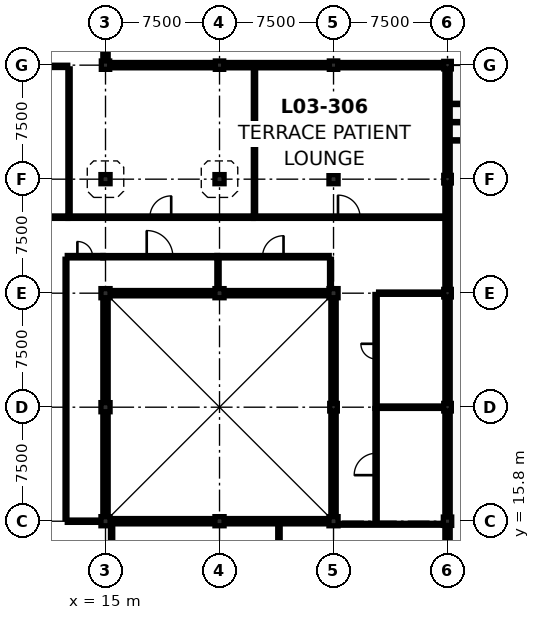
"""IFC4 building model, lengths in metres.
Left out: names, types, materials, properties, quantities, classifications, styles, units other than length and angle.
Written with IfcOpenShell. Run it as: python <this file> out.ifc"""

import sys

from ifc_helpers import new_model, si_unit, direction, frame, frame_2d, origin, origin_2d, place, context, subcontext, project, spatial, rectangle, extrude, element, fill, save


model = new_model("IFC4")
c1 = context("Model", 3, precision=1e-05, world=origin(), true_north=direction((0.0, 1.0)))
c2 = subcontext(c1, "Body", "Model", "MODEL_VIEW")
j1 = project(units=[si_unit("LENGTHUNIT", "METRE"), si_unit("PLANEANGLEUNIT", "RADIAN")], contexts=[c1])
p1 = place(None, origin())
s1 = spatial("IfcSite", under=j1, at=p1, CompositionType="ELEMENT")
p2 = place(p1, origin())
s2 = spatial("IfcBuilding", under=s1, at=p2, CompositionType="ELEMENT")
p3 = place(p2, frame((0.0, 0.0, 13.5)))
s3 = spatial("IfcBuildingStorey", under=s2, at=p3, CompositionType="ELEMENT", Elevation=13.5)
for number, where, z_axis, x_axis in (
    (1, (15.0, 15.8, 0.0), (0.0, 0.0, 1.0), (1.0, 0.0, 0.0)),
    (2, (15.0, 23.3, 0.0), (0.0, 0.0, 1.0), (1.0, 0.0, 0.0)),
    (3, (15.0, 30.8, 0.0), (0.0, 0.0, 1.0), (1.0, 0.0, 0.0)),
    (4, (15.0, 38.3, 0.0), (0.0, 0.0, 1.0), (1.0, 0.0, 0.0)),
):
    element("IfcColumn", number, at=place(p3, frame(where, z_axis=z_axis, x_axis=x_axis)), inside=s3, PredefinedType="COLUMN", context=c2, shape_type="SweptSolid", body=[
        extrude(rectangle(XDim=0.6, YDim=0.6, at=origin_2d()), origin(), (0.0, 0.0, 1.0), 3.72),
    ])
p4 = place(p3, frame((15.0, 45.8, 0.0), z_axis=(0.0, 0.0, 1.0), x_axis=(1.0, 0.0, 0.0)))
e5 = element("IfcColumn", 5, at=p4, inside=s3, PredefinedType="COLUMN", context=c2, shape_type="SweptSolid", body=[
    extrude(rectangle(XDim=0.55, YDim=0.55, at=origin_2d()), origin(), (0.0, 0.0, 1.0), 3.72),
])
for number, where, z_axis, x_axis in (
    (6, (22.5, 15.8, 0.0), (0.0, 0.0, 1.0), (1.0, 0.0, 0.0)),
    (7, (22.5, 30.8, 0.0), (0.0, 0.0, 1.0), (1.0, 0.0, 0.0)),
    (8, (22.5, 38.3, 0.0), (0.0, 0.0, 1.0), (1.0, 0.0, 0.0)),
):
    element("IfcColumn", number, at=place(p3, frame(where, z_axis=z_axis, x_axis=x_axis)), inside=s3, PredefinedType="COLUMN", context=c2, shape_type="SweptSolid", body=[
        extrude(rectangle(XDim=0.6, YDim=0.6, at=origin_2d()), origin(), (0.0, 0.0, 1.0), 3.72),
    ])
p5 = place(p3, frame((22.5, 45.8, 0.0), z_axis=(0.0, 0.0, 1.0), x_axis=(1.0, 0.0, 0.0)))
e9 = element("IfcColumn", 9, at=p5, inside=s3, PredefinedType="COLUMN", context=c2, shape_type="SweptSolid", body=[
    extrude(rectangle(XDim=0.55, YDim=0.55, at=origin_2d()), origin(), (0.0, 0.0, 1.0), 3.72),
])
p6 = place(p3, frame((30.0, 15.8, 0.0), z_axis=(0.0, 0.0, 1.0), x_axis=(1.0, 0.0, 0.0)))
e10 = element("IfcColumn", 10, at=p6, inside=s3, PredefinedType="COLUMN", context=c2, shape_type="SweptSolid", body=[
    extrude(rectangle(XDim=0.6, YDim=0.6, at=origin_2d()), origin(), (0.0, 0.0, 1.0), 3.72),
])
p7 = place(p3, frame((30.0, 23.3, 0.0), z_axis=(0.0, 0.0, 1.0), x_axis=(1.0, 0.0, 0.0)))
e11 = element("IfcColumn", 11, at=p7, inside=s3, PredefinedType="COLUMN", context=c2, shape_type="SweptSolid", body=[
    extrude(rectangle(XDim=0.5, YDim=0.5, at=origin_2d()), origin(), (0.0, 0.0, 1.0), 3.72),
])
for number, where, z_axis, x_axis in (
    (12, (30.0, 30.8, 0.0), (0.0, 0.0, 1.0), (1.0, 0.0, 0.0)),
    (13, (30.0, 38.3, 0.0), (0.0, 0.0, 1.0), (1.0, 0.0, 0.0)),
):
    element("IfcColumn", number, at=place(p3, frame(where, z_axis=z_axis, x_axis=x_axis)), inside=s3, PredefinedType="COLUMN", context=c2, shape_type="SweptSolid", body=[
        extrude(rectangle(XDim=0.6, YDim=0.6, at=origin_2d()), origin(), (0.0, 0.0, 1.0), 3.72),
    ])
p8 = place(p3, frame((30.0, 45.8, 0.0), z_axis=(0.0, 0.0, 1.0), x_axis=(1.0, 0.0, 0.0)))
e14 = element("IfcColumn", 14, at=p8, inside=s3, PredefinedType="COLUMN", context=c2, shape_type="SweptSolid", body=[
    extrude(rectangle(XDim=0.55, YDim=0.55, at=origin_2d()), origin(), (0.0, 0.0, 1.0), 3.72),
])
p9 = place(p3, frame((37.5, 15.8, 0.0), z_axis=(0.0, 0.0, 1.0), x_axis=(1.0, 0.0, 0.0)))
e15 = element("IfcColumn", 15, at=p9, inside=s3, PredefinedType="COLUMN", context=c2, shape_type="SweptSolid", body=[
    extrude(rectangle(XDim=0.55, YDim=0.55, at=origin_2d()), origin(), (0.0, 0.0, 1.0), 3.75),
])
for number, where, z_axis, x_axis in (
    (16, (37.5, 23.3, 0.0), (0.0, 0.0, 1.0), (1.0, 0.0, 0.0)),
    (17, (37.5, 30.8, 0.0), (0.0, 0.0, 1.0), (1.0, 0.0, 0.0)),
    (18, (37.5, 38.3, 0.0), (0.0, 0.0, 1.0), (1.0, 0.0, 0.0)),
    (19, (37.5, 45.8, 0.0), (0.0, 0.0, 1.0), (1.0, 0.0, 0.0)),
):
    element("IfcColumn", number, at=place(p3, frame(where, z_axis=z_axis, x_axis=x_axis)), inside=s3, PredefinedType="COLUMN", context=c2, shape_type="SweptSolid", body=[
        extrude(rectangle(XDim=0.5, YDim=0.5, at=origin_2d()), origin(), (0.0, 0.0, 1.0), 3.72),
    ])
for number, where, z_axis, x_axis in (
    (20, (15.275, 45.8, 0.0), (0.0, 0.0, 1.0), (1.0, 0.0, 0.0)),
    (21, (22.775, 45.8, 0.0), (0.0, 0.0, 1.0), (1.0, 0.0, 0.0)),
):
    element("IfcWall", number, at=place(p3, frame(where, z_axis=z_axis, x_axis=x_axis)), inside=s3, PredefinedType="SOLIDWALL", context=c2, shape_type="SweptSolid", body=[
        extrude(rectangle(XDim=6.95, YDim=0.35, at=frame_2d((3.475, 0.0))), origin(), (0.0, 0.0, 1.0), 2.805),
    ])
p10 = place(p3, frame((30.275, 45.8, 0.0), z_axis=(0.0, 0.0, 1.0), x_axis=(1.0, 0.0, 0.0)))
e22 = element("IfcWall", 22, at=p10, inside=s3, PredefinedType="SOLIDWALL", context=c2, shape_type="SweptSolid", body=[
    extrude(rectangle(XDim=6.975, YDim=0.35, at=frame_2d((3.488, 0.0))), origin(), (0.0, 0.0, 1.0), 3.055),
])
p11 = place(p3, frame((37.5, 45.55, 0.0), z_axis=(0.0, 0.0, 1.0), x_axis=(0.0, -1.0, 0.0)))
e23 = element("IfcWall", 23, at=p11, inside=s3, PredefinedType="SOLIDWALL", context=c2, shape_type="SweptSolid", body=[
    extrude(rectangle(XDim=7.0, YDim=0.35, at=frame_2d((3.5, 0.0))), origin(), (0.0, 0.0, 1.0), 3.7),
])
p12 = place(p11, frame((2.8, 0.0, 0.9)))
e24 = element("IfcOpeningElement", 24, at=p12, cuts=e23, PredefinedType="OPENING", context=c2, shape_type="SweptSolid", body=[
    extrude(rectangle(XDim=1.4, YDim=1.9, at=frame_2d((0.7, 0.95))), frame((0.0, 0.187, 0.0), z_axis=(0.0, -1.0, 0.0), x_axis=(1.0, 0.0, 0.0)), (0.0, 0.0, 1.0), 0.374),
])
for number, where, z_axis, x_axis in (
    (25, (37.5, 38.05, 0.0), (0.0, 0.0, 1.0), (0.0, -1.0, 0.0)),
    (26, (37.5, 30.55, 0.0), (0.0, 0.0, 1.0), (0.0, -1.0, 0.0)),
):
    element("IfcWall", number, at=place(p3, frame(where, z_axis=z_axis, x_axis=x_axis)), inside=s3, PredefinedType="SOLIDWALL", context=c2, shape_type="SweptSolid", body=[
        extrude(rectangle(XDim=7.0, YDim=0.35, at=frame_2d((3.5, 0.0))), origin(), (0.0, 0.0, 1.0), 3.7),
    ])
p13 = place(p3, frame((37.5, 23.05, 0.0), z_axis=(0.0, 0.0, 1.0), x_axis=(0.0, -1.0, 0.0)))
e27 = element("IfcWall", 27, at=p13, inside=s3, PredefinedType="SOLIDWALL", context=c2, shape_type="SweptSolid", body=[
    extrude(rectangle(XDim=6.975, YDim=0.35, at=frame_2d((3.488, 0.0))), origin(), (0.0, 0.0, 1.0), 3.055),
])
p14 = place(p3, frame((37.5, 15.525, 0.0), z_axis=(0.0, 0.0, 1.0), x_axis=(0.0, -1.0, 0.0)))
e28 = element("IfcWall", 28, at=p14, inside=s3, PredefinedType="SOLIDWALL", context=c2, shape_type="SweptSolid", body=[
    extrude(rectangle(XDim=6.95, YDim=0.35, at=frame_2d((3.475, 0.0))), origin(), (0.0, 0.0, 1.0), 3.005),
])
p15 = place(p14, frame((2.925, 0.0, 0.0)))
e29 = element("IfcOpeningElement", 29, at=p15, cuts=e28, PredefinedType="OPENING", context=c2, shape_type="SweptSolid", body=[
    extrude(rectangle(XDim=1.1, YDim=2.15, at=frame_2d((0.55, 1.075))), frame((0.0, 0.187, 0.0), z_axis=(0.0, -1.0, 0.0), x_axis=(1.0, 0.0, 0.0)), (0.0, 0.0, 1.0), 0.374),
])
p16 = place(p3, frame((15.0, 53.05, 0.0), z_axis=(0.0, 0.0, 1.0), x_axis=(0.0, -1.0, 0.0)))
e30 = element("IfcWall", 30, at=p16, inside=s3, PredefinedType="SOLIDWALL", context=c2, shape_type="SweptSolid", body=[
    extrude(rectangle(XDim=6.975, YDim=0.35, at=frame_2d((3.488, 0.0))), origin(), (0.0, 0.0, 1.0), 3.055),
])
p17 = place(p16, frame((2.587, 0.0, 0.9)))
e31 = element("IfcOpeningElement", 31, at=p17, cuts=e30, PredefinedType="OPENING", context=c2, shape_type="SweptSolid", body=[
    extrude(rectangle(XDim=1.8, YDim=1.5, at=frame_2d((0.9, 0.75))), frame((0.0, 0.187, 0.0), z_axis=(0.0, -1.0, 0.0), x_axis=(1.0, 0.0, 0.0)), (0.0, 0.0, 1.0), 0.374),
])
for number, where, z_axis, x_axis in (
    (32, (15.3, 15.8, 0.0), (0.0, 0.0, 1.0), (1.0, 0.0, 0.0)),
    (33, (22.8, 15.8, 0.0), (0.0, 0.0, 1.0), (1.0, 0.0, 0.0)),
):
    element("IfcWall", number, at=place(p3, frame(where, z_axis=z_axis, x_axis=x_axis)), inside=s3, PredefinedType="SOLIDWALL", context=c2, shape_type="SweptSolid", body=[
        extrude(rectangle(XDim=6.9, YDim=0.35, at=frame_2d((3.45, 0.0))), origin(), (0.0, 0.0, 1.0), 2.805),
    ])
p18 = place(p3, frame((30.0, 16.1, 0.0), z_axis=(0.0, 0.0, 1.0), x_axis=(0.0, 1.0, 0.0)))
e34 = element("IfcWall", 34, at=p18, inside=s3, PredefinedType="SOLIDWALL", context=c2, shape_type="SweptSolid", body=[
    extrude(rectangle(XDim=6.95, YDim=0.35, at=frame_2d((3.475, 0.0))), origin(), (0.0, 0.0, 1.0), 3.055),
])
p19 = place(p18, frame((2.575, 0.0, 0.9)))
e35 = element("IfcOpeningElement", 35, at=p19, cuts=e34, PredefinedType="OPENING", context=c2, shape_type="SweptSolid", body=[
    extrude(rectangle(XDim=1.8, YDim=1.7, at=frame_2d((0.9, 0.85))), frame((0.0, 0.187, 0.0), z_axis=(0.0, -1.0, 0.0), x_axis=(1.0, 0.0, 0.0)), (0.0, 0.0, 1.0), 0.374),
])
p20 = place(p3, frame((30.0, 23.55, 0.0), z_axis=(0.0, 0.0, 1.0), x_axis=(0.0, 1.0, 0.0)))
e36 = element("IfcWall", 36, at=p20, inside=s3, PredefinedType="SOLIDWALL", context=c2, shape_type="SweptSolid", body=[
    extrude(rectangle(XDim=6.95, YDim=0.35, at=frame_2d((3.475, 0.0))), origin(), (0.0, 0.0, 1.0), 3.055),
])
for number, where, z_axis, x_axis in (
    (37, (29.7, 30.8, 0.0), (0.0, 0.0, 1.0), (-1.0, 0.0, 0.0)),
    (38, (22.2, 30.8, 0.0), (0.0, 0.0, 1.0), (-1.0, 0.0, 0.0)),
    (39, (15.0, 30.5, 0.0), (0.0, 0.0, 1.0), (0.0, -1.0, 0.0)),
    (40, (15.0, 23.0, 0.0), (0.0, 0.0, 1.0), (0.0, -1.0, 0.0)),
):
    element("IfcWall", number, at=place(p3, frame(where, z_axis=z_axis, x_axis=x_axis)), inside=s3, PredefinedType="SOLIDWALL", context=c2, shape_type="SweptSolid", body=[
        extrude(rectangle(XDim=6.9, YDim=0.35, at=frame_2d((3.45, 0.0))), origin(), (0.0, 0.0, 1.0), 2.805),
    ])
p21 = place(p3, frame((0.187, 35.8, 0.0), z_axis=(0.0, 0.0, 1.0), x_axis=(1.0, 0.0, 0.0)))
e41 = element("IfcWall", 41, at=p21, inside=s3, PredefinedType="PARTITIONING", context=c2, shape_type="SweptSolid", body=[
    extrude(rectangle(XDim=12.328, YDim=0.16, at=frame_2d((6.164, 0.0))), origin(), (0.0, 0.0, 1.0), 2.805),
])
p22 = place(p21, frame((5.494, 0.0, 0.0)))
e42 = element("IfcOpeningElement", 42, at=p22, cuts=e41, PredefinedType="OPENING", context=c2, shape_type="SweptSolid", body=[
    extrude(rectangle(XDim=1.34, YDim=2.24, at=frame_2d((0.67, 1.12))), frame((0.0, 0.092, 0.0), z_axis=(0.0, -1.0, 0.0), x_axis=(1.0, 0.0, 0.0)), (0.0, 0.0, 1.0), 0.184),
])
p23 = place(p3, frame((12.527, 35.8, 0.0), z_axis=(0.0, 0.0, 1.0), x_axis=(1.0, 0.0, 0.0)))
e43 = element("IfcWall", 43, at=p23, inside=s3, PredefinedType="PARTITIONING", context=c2, shape_type="SweptSolid", body=[
    extrude(rectangle(XDim=12.188, YDim=0.16, at=frame_2d((6.094, 0.0))), origin(), (0.0, 0.0, 1.0), 2.805),
])
p24 = place(p23, frame((5.394, 0.0, 0.0)))
e44 = element("IfcOpeningElement", 44, at=p24, cuts=e43, PredefinedType="OPENING", context=c2, shape_type="SweptSolid", body=[
    extrude(rectangle(XDim=1.4, YDim=2.25, at=frame_2d((0.7, 1.125))), frame((0.0, 0.092, 0.0), z_axis=(0.0, -1.0, 0.0), x_axis=(1.0, 0.0, 0.0)), (0.0, 0.0, 1.0), 0.184),
])
p25 = place(p3, frame((24.727, 35.8, 0.0), z_axis=(0.0, 0.0, 1.0), x_axis=(1.0, 0.0, 0.0)))
e45 = element("IfcWall", 45, at=p25, inside=s3, PredefinedType="PARTITIONING", context=c2, shape_type="SweptSolid", body=[
    extrude(rectangle(XDim=12.586, YDim=0.16, at=frame_2d((6.293, 0.0))), origin(), (0.0, 0.0, 1.0), 3.055),
])
p26 = place(p25, frame((5.568, 0.0, 0.0)))
e46 = element("IfcOpeningElement", 46, at=p26, cuts=e45, PredefinedType="OPENING", context=c2, shape_type="SweptSolid", body=[
    extrude(rectangle(XDim=1.45, YDim=2.26, at=frame_2d((0.725, 1.13))), frame((0.0, 0.092, 0.0), z_axis=(0.0, -1.0, 0.0), x_axis=(1.0, 0.0, 0.0)), (0.0, 0.0, 1.0), 0.184),
])
p27 = place(p3, frame((12.485, 33.2, 0.0), z_axis=(0.0, 0.0, 1.0), x_axis=(1.0, 0.0, 0.0)))
e47 = element("IfcWall", 47, at=p27, inside=s3, PredefinedType="PARTITIONING", context=c2, shape_type="SweptSolid", body=[
    extrude(rectangle(XDim=2.33, YDim=0.16, at=frame_2d((1.165, 0.0))), origin(), (0.0, 0.0, 1.0), 2.805),
])
p28 = place(p27, frame((0.665, 0.0, 0.0)))
e48 = element("IfcOpeningElement", 48, at=p28, cuts=e47, PredefinedType="OPENING", context=c2, shape_type="SweptSolid", body=[
    extrude(rectangle(XDim=1.0, YDim=2.15, at=frame_2d((0.5, 1.075))), frame((0.0, 0.092, 0.0), z_axis=(0.0, -1.0, 0.0), x_axis=(1.0, 0.0, 0.0)), (0.0, 0.0, 1.0), 0.184),
])
p29 = place(p3, frame((14.827, 33.2, 0.0), z_axis=(0.0, 0.0, 1.0), x_axis=(1.0, 0.0, 0.0)))
e49 = element("IfcWall", 49, at=p29, inside=s3, PredefinedType="PARTITIONING", context=c2, shape_type="SweptSolid", body=[
    extrude(rectangle(XDim=7.488, YDim=0.15, at=frame_2d((3.744, 0.0))), origin(), (0.0, 0.0, 1.0), 2.805),
])
p30 = place(p29, frame((2.884, 0.0, 0.0)))
e50 = element("IfcOpeningElement", 50, at=p30, cuts=e49, PredefinedType="OPENING", context=c2, shape_type="SweptSolid", body=[
    extrude(rectangle(XDim=1.72, YDim=2.34, at=frame_2d((0.86, 1.17))), frame((0.0, 0.087, 0.0), z_axis=(0.0, -1.0, 0.0), x_axis=(1.0, 0.0, 0.0)), (0.0, 0.0, 1.0), 0.174),
])
p31 = place(p3, frame((22.327, 33.2, 0.0), z_axis=(0.0, 0.0, 1.0), x_axis=(1.0, 0.0, 0.0)))
e51 = element("IfcWall", 51, at=p31, inside=s3, PredefinedType="PARTITIONING", context=c2, shape_type="SweptSolid", body=[
    extrude(rectangle(XDim=7.388, YDim=0.16, at=frame_2d((3.694, 0.0))), origin(), (0.0, 0.0, 1.0), 2.805),
])
p32 = place(p31, frame((3.004, 0.0, 0.0)))
e52 = element("IfcOpeningElement", 52, at=p32, cuts=e51, PredefinedType="OPENING", context=c2, shape_type="SweptSolid", body=[
    extrude(rectangle(XDim=1.38, YDim=2.3, at=frame_2d((0.69, 1.15))), frame((0.0, 0.092, 0.0), z_axis=(0.0, -1.0, 0.0), x_axis=(1.0, 0.0, 0.0)), (0.0, 0.0, 1.0), 0.184),
])
p33 = place(p3, frame((32.8, 15.885, 0.0), z_axis=(0.0, 0.0, 1.0), x_axis=(0.0, 1.0, 0.0)))
e53 = element("IfcWall", 53, at=p33, inside=s3, PredefinedType="PARTITIONING", context=c2, shape_type="SweptSolid", body=[
    extrude(rectangle(XDim=7.33, YDim=0.15, at=frame_2d((3.665, 0.0))), origin(), (0.0, 0.0, 1.0), 3.055),
])
p34 = place(p33, frame((2.945, 0.0, 0.0)))
e54 = element("IfcOpeningElement", 54, at=p34, cuts=e53, PredefinedType="OPENING", context=c2, shape_type="SweptSolid", body=[
    extrude(rectangle(XDim=1.44, YDim=2.32, at=frame_2d((0.72, 1.16))), frame((0.0, 0.087, 0.0), z_axis=(0.0, -1.0, 0.0), x_axis=(1.0, 0.0, 0.0)), (0.0, 0.0, 1.0), 0.174),
])
p35 = place(p3, frame((32.8, 23.227, 0.0), z_axis=(0.0, 0.0, 1.0), x_axis=(0.0, 1.0, 0.0)))
e55 = element("IfcWall", 55, at=p35, inside=s3, PredefinedType="PARTITIONING", context=c2, shape_type="SweptSolid", body=[
    extrude(rectangle(XDim=7.488, YDim=0.15, at=frame_2d((3.744, 0.0))), origin(), (0.0, 0.0, 1.0), 3.7),
])
p36 = place(p35, frame((3.244, 0.0, 0.0)))
e56 = element("IfcOpeningElement", 56, at=p36, cuts=e55, PredefinedType="OPENING", context=c2, shape_type="SweptSolid", body=[
    extrude(rectangle(XDim=1.0, YDim=2.15, at=frame_2d((0.5, 1.075))), frame((0.0, 0.087, 0.0), z_axis=(0.0, -1.0, 0.0), x_axis=(1.0, 0.0, 0.0)), (0.0, 0.0, 1.0), 0.174),
])
p37 = place(p3, frame((30.084, 15.6, 0.0), z_axis=(0.0, 0.0, 1.0), x_axis=(1.0, 0.0, 0.0)))
e57 = element("IfcWall", 57, at=p37, inside=s3, PredefinedType="PARTITIONING", context=c2, shape_type="SweptSolid", body=[
    extrude(rectangle(XDim=7.128, YDim=0.125, at=frame_2d((3.564, 0.0))), origin(), (0.0, 0.0, 1.0), 3.005),
])
p38 = place(p3, frame((0.287, 45.72, 0.0), z_axis=(0.0, 0.0, 1.0), x_axis=(1.0, 0.0, 0.0)))
e58 = element("IfcWall", 58, at=p38, inside=s3, PredefinedType="PARTITIONING", context=c2, shape_type="SweptSolid", body=[
    extrude(rectangle(XDim=12.228, YDim=0.15, at=frame_2d((6.114, 0.0))), origin(), (0.0, 0.0, 1.0), 2.805),
])
p39 = place(p3, frame((12.485, 15.8, 0.0), z_axis=(0.0, 0.0, 1.0), x_axis=(1.0, 0.0, 0.0)))
e59 = element("IfcWall", 59, at=p39, inside=s3, PredefinedType="PARTITIONING", context=c2, shape_type="SweptSolid", body=[
    extrude(rectangle(XDim=2.203, YDim=0.15, at=frame_2d((1.102, 0.0))), origin(), (0.0, 0.0, 1.0), 2.805),
])
p40 = place(p3, frame((15.4, 8.187, 0.0), z_axis=(0.0, 0.0, 1.0), x_axis=(0.0, 1.0, 0.0)))
e60 = element("IfcWall", 60, at=p40, inside=s3, PredefinedType="PARTITIONING", context=c2, shape_type="SweptSolid", body=[
    extrude(rectangle(XDim=7.426, YDim=0.15, at=frame_2d((3.713, 0.0))), origin(), (0.0, 0.0, 1.0), 2.805),
])
p41 = place(p3, frame((26.41, 8.187, 0.0), z_axis=(0.0, 0.0, 1.0), x_axis=(0.0, 1.0, 0.0)))
e61 = element("IfcWall", 61, at=p41, inside=s3, PredefinedType="PARTITIONING", context=c2, shape_type="SweptSolid", body=[
    extrude(rectangle(XDim=7.426, YDim=0.16, at=frame_2d((3.713, 0.0))), origin(), (0.0, 0.0, 1.0), 2.805),
])
p42 = place(p3, frame((12.6, 35.892, 0.0), z_axis=(0.0, 0.0, 1.0), x_axis=(0.0, 1.0, 0.0)))
e62 = element("IfcWall", 62, at=p42, inside=s3, PredefinedType="PARTITIONING", context=c2, shape_type="SweptSolid", body=[
    extrude(rectangle(XDim=9.663, YDim=0.15, at=frame_2d((4.832, 0.0))), origin(), (0.0, 0.0, 1.0), 2.805),
])
p43 = place(p3, frame((24.8, 35.892, 0.0), z_axis=(0.0, 0.0, 1.0), x_axis=(0.0, 1.0, 0.0)))
e63 = element("IfcWall", 63, at=p43, inside=s3, PredefinedType="PARTITIONING", context=c2, shape_type="SweptSolid", body=[
    extrude(rectangle(XDim=9.721, YDim=0.15, at=frame_2d((4.86, 0.0))), origin(), (0.0, 0.0, 1.0), 2.805),
])
p44 = place(p3, frame((12.4, 15.965, 0.0), z_axis=(0.0, 0.0, 1.0), x_axis=(0.0, 1.0, 0.0)))
e64 = element("IfcWall", 64, at=p44, inside=s3, PredefinedType="PARTITIONING", context=c2, shape_type="SweptSolid", body=[
    extrude(rectangle(XDim=17.07, YDim=0.125, at=frame_2d((8.535, 0.0))), origin(), (0.0, 0.0, 1.0), 2.805),
])
p45 = place(p3, frame((22.4, 31.112, 0.0), z_axis=(0.0, 0.0, 1.0), x_axis=(0.0, 1.0, 0.0)))
e65 = element("IfcWall", 65, at=p45, inside=s3, PredefinedType="PARTITIONING", context=c2, shape_type="SweptSolid", body=[
    extrude(rectangle(XDim=1.996, YDim=0.15, at=frame_2d((0.998, 0.0))), origin(), (0.0, 0.0, 1.0), 2.805),
])
p46 = place(p3, frame((29.8, 31.112, 0.0), z_axis=(0.0, 0.0, 1.0), x_axis=(0.0, 1.0, 0.0)))
e66 = element("IfcWall", 66, at=p46, inside=s3, PredefinedType="PARTITIONING", context=c2, shape_type="SweptSolid", body=[
    extrude(rectangle(XDim=1.923, YDim=0.125, at=frame_2d((0.961, 0.0))), origin(), (0.0, 0.0, 1.0), 3.055),
])
p47 = place(p3, frame((32.887, 23.3, 0.0), z_axis=(0.0, 0.0, 1.0), x_axis=(1.0, 0.0, 0.0)))
e67 = element("IfcWall", 67, at=p47, inside=s3, PredefinedType="PARTITIONING", context=c2, shape_type="SweptSolid", body=[
    extrude(rectangle(XDim=4.351, YDim=0.16, at=frame_2d((2.176, 0.0))), origin(), (0.0, 0.0, 1.0), 3.7),
])
p48 = place(p3, frame((32.965, 30.8, 0.0), z_axis=(0.0, 0.0, 1.0), x_axis=(1.0, 0.0, 0.0)))
e68 = element("IfcWall", 68, at=p48, inside=s3, PredefinedType="PARTITIONING", context=c2, shape_type="SweptSolid", body=[
    extrude(rectangle(XDim=4.273, YDim=0.15, at=frame_2d((2.136, 0.0))), origin(), (0.0, 0.0, 1.0), 3.7),
])
p49 = place(p12, origin())
e69 = element("IfcWindow", 69, at=p49, inside=s3, PartitioningType="SINGLE_PANEL", PredefinedType="WINDOW", context=c2, shape_type="SweptSolid", body=[
    extrude(rectangle(XDim=1.4, YDim=1.9, at=frame_2d((0.7, 0.95))), frame((0.0, 0.03, 0.0), z_axis=(0.0, -1.0, 0.0), x_axis=(1.0, 0.0, 0.0)), (0.0, 0.0, 1.0), 0.06),
])
fill(e24, e69)
p50 = place(p19, origin())
e70 = element("IfcWindow", 70, at=p50, inside=s3, PartitioningType="DOUBLE_PANEL_VERTICAL", PredefinedType="WINDOW", context=c2, shape_type="SweptSolid", body=[
    extrude(rectangle(XDim=1.8, YDim=1.7, at=frame_2d((0.9, 0.85))), frame((0.0, 0.03, 0.0), z_axis=(0.0, -1.0, 0.0), x_axis=(1.0, 0.0, 0.0)), (0.0, 0.0, 1.0), 0.06),
])
fill(e35, e70)
p51 = place(p24, origin())
e71 = element("IfcDoor", 71, at=p51, inside=s3, OperationType="SINGLE_SWING_RIGHT", PredefinedType="DOOR", context=c2, shape_type="SweptSolid", body=[
    extrude(rectangle(XDim=1.4, YDim=2.25, at=frame_2d((0.7, 1.125))), frame((0.0, 0.025, 0.0), z_axis=(0.0, -1.0, 0.0), x_axis=(1.0, 0.0, 0.0)), (0.0, 0.0, 1.0), 0.05),
])
fill(e44, e71)
p52 = place(p26, origin())
e72 = element("IfcDoor", 72, at=p52, inside=s3, OperationType="SINGLE_SWING_LEFT", PredefinedType="DOOR", context=c2, shape_type="SweptSolid", body=[
    extrude(rectangle(XDim=1.45, YDim=2.26, at=frame_2d((0.725, 1.13))), frame((0.0, 0.025, 0.0), z_axis=(0.0, -1.0, 0.0), x_axis=(1.0, 0.0, 0.0)), (0.0, 0.0, 1.0), 0.05),
])
fill(e46, e72)
p53 = place(p28, origin())
e73 = element("IfcDoor", 73, at=p53, inside=s3, OperationType="SINGLE_SWING_LEFT", PredefinedType="DOOR", context=c2, shape_type="SweptSolid", body=[
    extrude(rectangle(XDim=1.0, YDim=2.15, at=frame_2d((0.5, 1.075))), frame((0.0, 0.025, 0.0), z_axis=(0.0, -1.0, 0.0), x_axis=(1.0, 0.0, 0.0)), (0.0, 0.0, 1.0), 0.05),
])
fill(e48, e73)
p54 = place(p30, origin())
e74 = element("IfcDoor", 74, at=p54, inside=s3, OperationType="SINGLE_SWING_LEFT", PredefinedType="DOOR", context=c2, shape_type="SweptSolid", body=[
    extrude(rectangle(XDim=1.72, YDim=2.34, at=frame_2d((0.86, 1.17))), frame((0.0, 0.025, 0.0), z_axis=(0.0, -1.0, 0.0), x_axis=(1.0, 0.0, 0.0)), (0.0, 0.0, 1.0), 0.05),
])
fill(e50, e74)
p55 = place(p32, origin())
e75 = element("IfcDoor", 75, at=p55, inside=s3, OperationType="SINGLE_SWING_RIGHT", PredefinedType="DOOR", context=c2, shape_type="SweptSolid", body=[
    extrude(rectangle(XDim=1.38, YDim=2.3, at=frame_2d((0.69, 1.15))), frame((0.0, 0.025, 0.0), z_axis=(0.0, -1.0, 0.0), x_axis=(1.0, 0.0, 0.0)), (0.0, 0.0, 1.0), 0.05),
])
fill(e52, e75)
p56 = place(p34, origin())
e76 = element("IfcDoor", 76, at=p56, inside=s3, OperationType="SINGLE_SWING_LEFT", PredefinedType="DOOR", context=c2, shape_type="SweptSolid", body=[
    extrude(rectangle(XDim=1.44, YDim=2.32, at=frame_2d((0.72, 1.16))), frame((0.0, 0.025, 0.0), z_axis=(0.0, -1.0, 0.0), x_axis=(1.0, 0.0, 0.0)), (0.0, 0.0, 1.0), 0.05),
])
fill(e54, e76)
p57 = place(p36, origin())
e77 = element("IfcDoor", 77, at=p57, inside=s3, OperationType="SINGLE_SWING_RIGHT", PredefinedType="DOOR", context=c2, shape_type="SweptSolid", body=[
    extrude(rectangle(XDim=1.0, YDim=2.15, at=frame_2d((0.5, 1.075))), frame((0.0, 0.025, 0.0), z_axis=(0.0, -1.0, 0.0), x_axis=(1.0, 0.0, 0.0)), (0.0, 0.0, 1.0), 0.05),
])
fill(e56, e77)
save(model, sys.argv[1])
